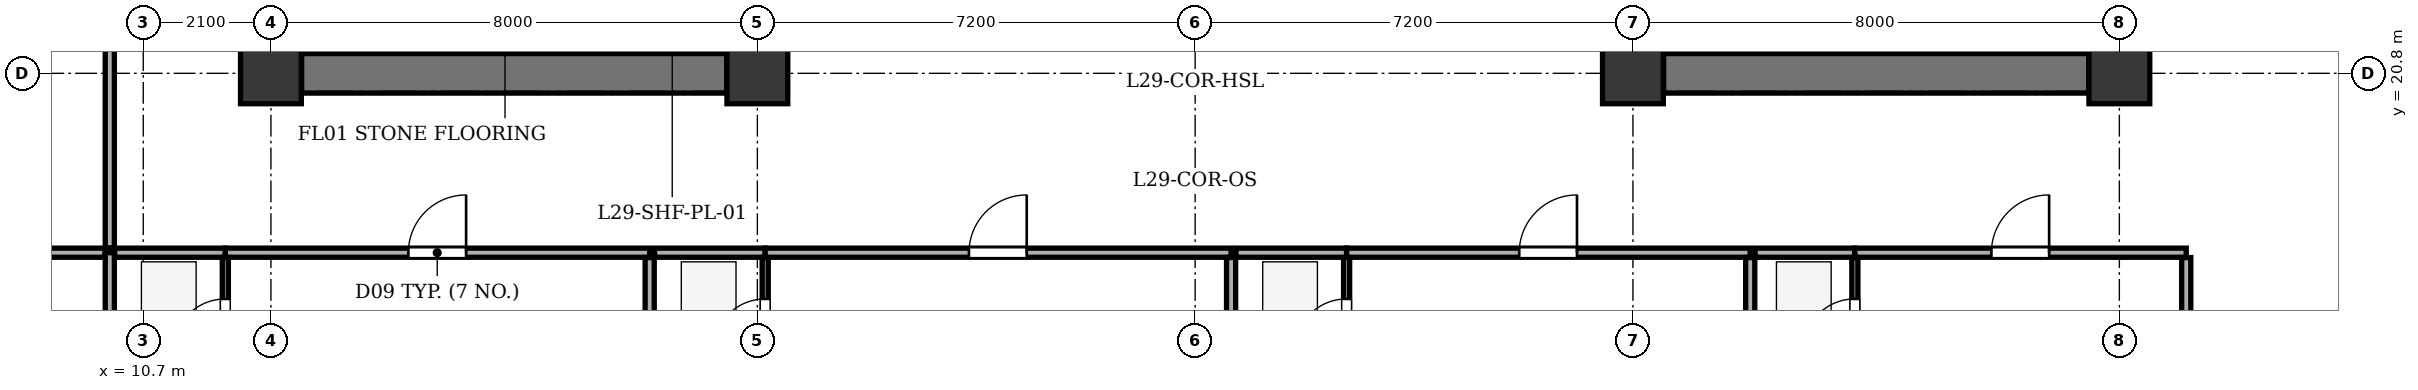
"""IFC4 building model, lengths in metres.
Left out: names, types, materials, properties, quantities, classifications, styles, units other than length and angle.
Written with IfcOpenShell. Run it as: python <this file> out.ifc"""

import sys

from ifc_helpers import new_model, si_unit, direction, frame, frame_2d, origin, origin_2d, place, context, subcontext, project, spatial, rectangle, extrude, element, fill, save


model = new_model("IFC4")
c1 = context("Model", 3, precision=1e-05, world=origin(), true_north=direction((0.0, 1.0)))
c2 = subcontext(c1, "Body", "Model", "MODEL_VIEW")
j1 = project(units=[si_unit("LENGTHUNIT", "METRE"), si_unit("PLANEANGLEUNIT", "RADIAN")], contexts=[c1])
p1 = place(None, origin())
s1 = spatial("IfcSite", under=j1, at=p1, CompositionType="ELEMENT")
p2 = place(p1, origin())
s2 = spatial("IfcBuilding", under=s1, at=p2, CompositionType="ELEMENT")
p3 = place(p2, frame((0.0, 0.0, 120.3)))
s3 = spatial("IfcBuildingStorey", under=s2, at=p3, CompositionType="ELEMENT", Elevation=120.3)
for number, where, z_axis, x_axis in (
    (1, (12.8, 20.8, 0.0), (0.0, 0.0, 1.0), (1.0, 0.0, 0.0)),
    (2, (20.8, 20.8, 0.0), (0.0, 0.0, 1.0), (1.0, 0.0, 0.0)),
    (3, (35.2, 20.8, 0.0), (0.0, 0.0, 1.0), (1.0, 0.0, 0.0)),
    (4, (43.2, 20.8, 0.0), (0.0, 0.0, 1.0), (1.0, 0.0, 0.0)),
):
    element("IfcColumn", number, at=place(p3, frame(where, z_axis=z_axis, x_axis=x_axis)), inside=s3, PredefinedType="COLUMN", context=c2, shape_type="SweptSolid", body=[
        extrude(rectangle(XDim=1.0, YDim=1.0, at=origin_2d()), origin(), (0.0, 0.0, 1.0), 3.5),
    ])
p4 = place(p3, frame((13.305, 20.8, 0.0), z_axis=(0.0, 0.0, 1.0), x_axis=(1.0, 0.0, 0.0)))
e5 = element("IfcWall", 5, at=p4, inside=s3, PredefinedType="SHEAR", context=c2, shape_type="SweptSolid", body=[
    extrude(rectangle(XDim=6.99, YDim=0.65, at=frame_2d((3.495, 0.0))), origin(), (0.0, 0.0, 1.0), 3.2),
])
p5 = place(p3, frame((16.435, 21.135, 0.0), z_axis=(0.0, 0.0, 1.0), x_axis=(0.0, 1.0, 0.0)))
e6 = element("IfcWall", 6, at=p5, inside=s3, PredefinedType="SHEAR", context=c2, shape_type="SweptSolid", body=[
    extrude(rectangle(XDim=12.13, YDim=0.25, at=frame_2d((6.065, 0.0))), origin(), (0.0, 0.0, 1.0), 3.2),
])
p6 = place(p5, frame((0.515, 0.0, 0.0)))
e7 = element("IfcOpeningElement", 7, at=p6, cuts=e6, PredefinedType="OPENING", context=c2, shape_type="SweptSolid", body=[
    extrude(rectangle(XDim=1.2, YDim=2.15, at=frame_2d((0.6, 1.075))), frame((0.0, 0.135, 0.0), z_axis=(0.0, -1.0, 0.0), x_axis=(1.0, 0.0, 0.0)), (0.0, 0.0, 1.0), 0.27),
])
p7 = place(p5, frame((2.665, 0.0, 0.0)))
e8 = element("IfcOpeningElement", 8, at=p7, cuts=e6, PredefinedType="OPENING", context=c2, shape_type="SweptSolid", body=[
    extrude(rectangle(XDim=1.15, YDim=2.15, at=frame_2d((0.575, 1.075))), frame((0.0, 0.135, 0.0), z_axis=(0.0, -1.0, 0.0), x_axis=(1.0, 0.0, 0.0)), (0.0, 0.0, 1.0), 0.27),
])
p8 = place(p3, frame((35.705, 20.8, 0.0), z_axis=(0.0, 0.0, 1.0), x_axis=(1.0, 0.0, 0.0)))
e9 = element("IfcWall", 9, at=p8, inside=s3, PredefinedType="SHEAR", context=c2, shape_type="SweptSolid", body=[
    extrude(rectangle(XDim=6.99, YDim=0.65, at=frame_2d((3.495, 0.0))), origin(), (0.0, 0.0, 1.0), 3.2),
])
p9 = place(p3, frame((39.565, 21.135, 0.0), z_axis=(0.0, 0.0, 1.0), x_axis=(0.0, 1.0, 0.0)))
e10 = element("IfcWall", 10, at=p9, inside=s3, PredefinedType="SHEAR", context=c2, shape_type="SweptSolid", body=[
    extrude(rectangle(XDim=12.13, YDim=0.25, at=frame_2d((6.065, 0.0))), origin(), (0.0, 0.0, 1.0), 3.2),
])
p10 = place(p9, frame((0.515, 0.0, 0.0)))
e11 = element("IfcOpeningElement", 11, at=p10, cuts=e10, PredefinedType="OPENING", context=c2, shape_type="SweptSolid", body=[
    extrude(rectangle(XDim=1.2, YDim=2.15, at=frame_2d((0.6, 1.075))), frame((0.0, 0.135, 0.0), z_axis=(0.0, -1.0, 0.0), x_axis=(1.0, 0.0, 0.0)), (0.0, 0.0, 1.0), 0.27),
])
p11 = place(p9, frame((2.665, 0.0, 0.0)))
e12 = element("IfcOpeningElement", 12, at=p11, cuts=e10, PredefinedType="OPENING", context=c2, shape_type="SweptSolid", body=[
    extrude(rectangle(XDim=1.15, YDim=2.15, at=frame_2d((0.575, 1.075))), frame((0.0, 0.135, 0.0), z_axis=(0.0, -1.0, 0.0), x_axis=(1.0, 0.0, 0.0)), (0.0, 0.0, 1.0), 0.27),
])
p12 = place(p3, frame((10.15, 1.875, 0.0), z_axis=(0.0, 0.0, 1.0), x_axis=(0.0, 1.0, 0.0)))
e13 = element("IfcWall", 13, at=p12, inside=s3, PredefinedType="PARTITIONING", context=c2, shape_type="SweptSolid", body=[
    extrude(rectangle(XDim=15.975, YDim=0.15, at=frame_2d((7.988, 0.0))), origin(), (0.0, 0.0, 1.0), 3.2),
])
p13 = place(p3, frame((10.23, 17.85, 0.0), z_axis=(0.0, 0.0, 1.0), x_axis=(1.0, 0.0, 0.0)))
e14 = element("IfcWall", 14, at=p13, inside=s3, PredefinedType="PARTITIONING", context=c2, shape_type="SweptSolid", body=[
    extrude(rectangle(XDim=1.82, YDim=0.15, at=frame_2d((0.91, 0.0))), origin(), (0.0, 0.0, 1.0), 3.2),
])
p14 = place(p3, frame((12.05, 17.85, 0.0), z_axis=(0.0, 0.0, 1.0), x_axis=(1.0, 0.0, 0.0)))
e15 = element("IfcWall", 15, at=p14, inside=s3, PredefinedType="PARTITIONING", context=c2, shape_type="SweptSolid", body=[
    extrude(rectangle(XDim=6.979, YDim=0.15, at=frame_2d((3.49, 0.0))), origin(), (0.0, 0.0, 1.0), 3.2),
])
p15 = place(p14, frame((3.01, 0.0, 0.0)))
e16 = element("IfcOpeningElement", 16, at=p15, cuts=e15, PredefinedType="OPENING", context=c2, shape_type="SweptSolid", body=[
    extrude(rectangle(XDim=0.95, YDim=2.1, at=frame_2d((0.475, 1.05))), frame((0.0, 0.085, 0.0), z_axis=(0.0, -1.0, 0.0), x_axis=(1.0, 0.0, 0.0)), (0.0, 0.0, 1.0), 0.17),
])
p16 = place(p3, frame((12.05, 15.52, 0.0), z_axis=(0.0, 0.0, 1.0), x_axis=(0.0, 1.0, 0.0)))
e17 = element("IfcWall", 17, at=p16, inside=s3, PredefinedType="PARTITIONING", context=c2, shape_type="SweptSolid", body=[
    extrude(rectangle(XDim=2.25, YDim=0.1, at=frame_2d((1.125, 0.0))), origin(), (0.0, 0.0, 1.0), 3.2),
])
p17 = place(p16, frame((0.72, 0.0, 0.0)))
e18 = element("IfcOpeningElement", 18, at=p17, cuts=e17, PredefinedType="OPENING", context=c2, shape_type="SweptSolid", body=[
    extrude(rectangle(XDim=0.85, YDim=2.05, at=frame_2d((0.425, 1.025))), frame((0.0, 0.06, 0.0), z_axis=(0.0, -1.0, 0.0), x_axis=(1.0, 0.0, 0.0)), (0.0, 0.0, 1.0), 0.12),
])
p18 = place(p3, frame((19.029, 1.875, 0.0), z_axis=(0.0, 0.0, 1.0), x_axis=(0.0, 1.0, 0.0)))
e19 = element("IfcWall", 19, at=p18, inside=s3, PredefinedType="PARTITIONING", context=c2, shape_type="SweptSolid", body=[
    extrude(rectangle(XDim=15.895, YDim=0.15, at=frame_2d((7.948, 0.0))), origin(), (0.0, 0.0, 1.0), 3.2),
])
p19 = place(p3, frame((19.109, 17.85, 0.0), z_axis=(0.0, 0.0, 1.0), x_axis=(1.0, 0.0, 0.0)))
e20 = element("IfcWall", 20, at=p19, inside=s3, PredefinedType="PARTITIONING", context=c2, shape_type="SweptSolid", body=[
    extrude(rectangle(XDim=1.82, YDim=0.15, at=frame_2d((0.91, 0.0))), origin(), (0.0, 0.0, 1.0), 3.2),
])
p20 = place(p3, frame((20.929, 17.85, 0.0), z_axis=(0.0, 0.0, 1.0), x_axis=(1.0, 0.0, 0.0)))
e21 = element("IfcWall", 21, at=p20, inside=s3, PredefinedType="PARTITIONING", context=c2, shape_type="SweptSolid", body=[
    extrude(rectangle(XDim=7.662, YDim=0.15, at=frame_2d((3.831, 0.0))), origin(), (0.0, 0.0, 1.0), 3.2),
])
p21 = place(p20, frame((3.351, 0.0, 0.0)))
e22 = element("IfcOpeningElement", 22, at=p21, cuts=e21, PredefinedType="OPENING", context=c2, shape_type="SweptSolid", body=[
    extrude(rectangle(XDim=0.95, YDim=2.1, at=frame_2d((0.475, 1.05))), frame((0.0, 0.085, 0.0), z_axis=(0.0, -1.0, 0.0), x_axis=(1.0, 0.0, 0.0)), (0.0, 0.0, 1.0), 0.17),
])
p22 = place(p3, frame((20.929, 15.52, 0.0), z_axis=(0.0, 0.0, 1.0), x_axis=(0.0, 1.0, 0.0)))
e23 = element("IfcWall", 23, at=p22, inside=s3, PredefinedType="PARTITIONING", context=c2, shape_type="SweptSolid", body=[
    extrude(rectangle(XDim=2.25, YDim=0.1, at=frame_2d((1.125, 0.0))), origin(), (0.0, 0.0, 1.0), 2.535),
])
p23 = place(p22, frame((0.72, 0.0, 0.0)))
e24 = element("IfcOpeningElement", 24, at=p23, cuts=e23, PredefinedType="OPENING", context=c2, shape_type="SweptSolid", body=[
    extrude(rectangle(XDim=0.85, YDim=2.05, at=frame_2d((0.425, 1.025))), frame((0.0, 0.06, 0.0), z_axis=(0.0, -1.0, 0.0), x_axis=(1.0, 0.0, 0.0)), (0.0, 0.0, 1.0), 0.12),
])
p24 = place(p3, frame((28.591, 1.875, 0.0), z_axis=(0.0, 0.0, 1.0), x_axis=(0.0, 1.0, 0.0)))
e25 = element("IfcWall", 25, at=p24, inside=s3, PredefinedType="PARTITIONING", context=c2, shape_type="SweptSolid", body=[
    extrude(rectangle(XDim=15.895, YDim=0.15, at=frame_2d((7.948, 0.0))), origin(), (0.0, 0.0, 1.0), 3.2),
])
p25 = place(p3, frame((28.671, 17.85, 0.0), z_axis=(0.0, 0.0, 1.0), x_axis=(1.0, 0.0, 0.0)))
e26 = element("IfcWall", 26, at=p25, inside=s3, PredefinedType="PARTITIONING", context=c2, shape_type="SweptSolid", body=[
    extrude(rectangle(XDim=1.82, YDim=0.15, at=frame_2d((0.91, 0.0))), origin(), (0.0, 0.0, 1.0), 3.2),
])
p26 = place(p3, frame((30.491, 17.85, 0.0), z_axis=(0.0, 0.0, 1.0), x_axis=(1.0, 0.0, 0.0)))
e27 = element("IfcWall", 27, at=p26, inside=s3, PredefinedType="PARTITIONING", context=c2, shape_type="SweptSolid", body=[
    extrude(rectangle(XDim=6.638, YDim=0.15, at=frame_2d((3.319, 0.0))), origin(), (0.0, 0.0, 1.0), 3.2),
])
p27 = place(p26, frame((2.839, 0.0, 0.0)))
e28 = element("IfcOpeningElement", 28, at=p27, cuts=e27, PredefinedType="OPENING", context=c2, shape_type="SweptSolid", body=[
    extrude(rectangle(XDim=0.95, YDim=2.1, at=frame_2d((0.475, 1.05))), frame((0.0, 0.085, 0.0), z_axis=(0.0, -1.0, 0.0), x_axis=(1.0, 0.0, 0.0)), (0.0, 0.0, 1.0), 0.17),
])
p28 = place(p3, frame((30.491, 15.52, 0.0), z_axis=(0.0, 0.0, 1.0), x_axis=(0.0, 1.0, 0.0)))
e29 = element("IfcWall", 29, at=p28, inside=s3, PredefinedType="PARTITIONING", context=c2, shape_type="SweptSolid", body=[
    extrude(rectangle(XDim=2.25, YDim=0.1, at=frame_2d((1.125, 0.0))), origin(), (0.0, 0.0, 1.0), 3.2),
])
p29 = place(p28, frame((0.72, 0.0, 0.0)))
e30 = element("IfcOpeningElement", 30, at=p29, cuts=e29, PredefinedType="OPENING", context=c2, shape_type="SweptSolid", body=[
    extrude(rectangle(XDim=0.85, YDim=2.05, at=frame_2d((0.425, 1.025))), frame((0.0, 0.06, 0.0), z_axis=(0.0, -1.0, 0.0), x_axis=(1.0, 0.0, 0.0)), (0.0, 0.0, 1.0), 0.12),
])
p30 = place(p3, frame((37.129, 1.875, 0.0), z_axis=(0.0, 0.0, 1.0), x_axis=(0.0, 1.0, 0.0)))
e31 = element("IfcWall", 31, at=p30, inside=s3, PredefinedType="PARTITIONING", context=c2, shape_type="SweptSolid", body=[
    extrude(rectangle(XDim=15.895, YDim=0.15, at=frame_2d((7.948, 0.0))), origin(), (0.0, 0.0, 1.0), 3.2),
])
p31 = place(p3, frame((37.209, 17.85, 0.0), z_axis=(0.0, 0.0, 1.0), x_axis=(1.0, 0.0, 0.0)))
e32 = element("IfcWall", 32, at=p31, inside=s3, PredefinedType="PARTITIONING", context=c2, shape_type="SweptSolid", body=[
    extrude(rectangle(XDim=1.641, YDim=0.15, at=frame_2d((0.821, 0.0))), origin(), (0.0, 0.0, 1.0), 3.2),
])
p32 = place(p3, frame((38.85, 17.85, 0.0), z_axis=(0.0, 0.0, 1.0), x_axis=(1.0, 0.0, 0.0)))
e33 = element("IfcWall", 33, at=p32, inside=s3, PredefinedType="PARTITIONING", context=c2, shape_type="SweptSolid", body=[
    extrude(rectangle(XDim=5.45, YDim=0.15, at=frame_2d((2.725, 0.0))), origin(), (0.0, 0.0, 1.0), 3.2),
])
p33 = place(p32, frame((2.245, 0.0, 0.0)))
e34 = element("IfcOpeningElement", 34, at=p33, cuts=e33, PredefinedType="OPENING", context=c2, shape_type="SweptSolid", body=[
    extrude(rectangle(XDim=0.95, YDim=2.1, at=frame_2d((0.475, 1.05))), frame((0.0, 0.085, 0.0), z_axis=(0.0, -1.0, 0.0), x_axis=(1.0, 0.0, 0.0)), (0.0, 0.0, 1.0), 0.17),
])
p34 = place(p3, frame((38.85, 15.52, 0.0), z_axis=(0.0, 0.0, 1.0), x_axis=(0.0, 1.0, 0.0)))
e35 = element("IfcWall", 35, at=p34, inside=s3, PredefinedType="PARTITIONING", context=c2, shape_type="SweptSolid", body=[
    extrude(rectangle(XDim=2.25, YDim=0.1, at=frame_2d((1.125, 0.0))), origin(), (0.0, 0.0, 1.0), 3.2),
])
p35 = place(p34, frame((0.72, 0.0, 0.0)))
e36 = element("IfcOpeningElement", 36, at=p35, cuts=e35, PredefinedType="OPENING", context=c2, shape_type="SweptSolid", body=[
    extrude(rectangle(XDim=0.85, YDim=2.05, at=frame_2d((0.425, 1.025))), frame((0.0, 0.06, 0.0), z_axis=(0.0, -1.0, 0.0), x_axis=(1.0, 0.0, 0.0)), (0.0, 0.0, 1.0), 0.12),
])
p36 = place(p3, frame((44.3, 1.875, 0.0), z_axis=(0.0, 0.0, 1.0), x_axis=(0.0, 1.0, 0.0)))
e37 = element("IfcWall", 37, at=p36, inside=s3, PredefinedType="PARTITIONING", context=c2, shape_type="SweptSolid", body=[
    extrude(rectangle(XDim=15.895, YDim=0.15, at=frame_2d((7.948, 0.0))), origin(), (0.0, 0.0, 1.0), 3.2),
])
p37 = place(p3, frame((4.675, 17.85, 0.0), z_axis=(0.0, 0.0, 1.0), x_axis=(1.0, 0.0, 0.0)))
e38 = element("IfcWall", 38, at=p37, inside=s3, PredefinedType="PARTITIONING", context=c2, shape_type="SweptSolid", body=[
    extrude(rectangle(XDim=5.395, YDim=0.15, at=frame_2d((2.698, 0.0))), origin(), (0.0, 0.0, 1.0), 3.2),
])
p38 = place(p3, frame((10.15, 17.93, 0.0), z_axis=(0.0, 0.0, 1.0), x_axis=(0.0, 1.0, 0.0)))
e39 = element("IfcWall", 39, at=p38, inside=s3, PredefinedType="PARTITIONING", context=c2, shape_type="SweptSolid", body=[
    extrude(rectangle(XDim=18.54, YDim=0.15, at=frame_2d((9.27, 0.0))), origin(), (0.0, 0.0, 1.0), 3.2),
])
p39 = place(p38, frame((8.79, 0.0, 0.0)))
e40 = element("IfcOpeningElement", 40, at=p39, cuts=e39, PredefinedType="OPENING", context=c2, shape_type="SweptSolid", body=[
    extrude(rectangle(XDim=0.95, YDim=2.1, at=frame_2d((0.475, 1.05))), frame((0.0, 0.085, 0.0), z_axis=(0.0, -1.0, 0.0), x_axis=(1.0, 0.0, 0.0)), (0.0, 0.0, 1.0), 0.17),
])
p40 = place(p17, origin())
e41 = element("IfcDoor", 41, at=p40, inside=s3, OperationType="SINGLE_SWING_LEFT", PredefinedType="DOOR", context=c2, shape_type="SweptSolid", body=[
    extrude(rectangle(XDim=0.85, YDim=2.05, at=frame_2d((0.425, 1.025))), frame((0.0, 0.025, 0.0), z_axis=(0.0, -1.0, 0.0), x_axis=(1.0, 0.0, 0.0)), (0.0, 0.0, 1.0), 0.05),
])
fill(e18, e41)
p41 = place(p15, origin())
e42 = element("IfcDoor", 42, at=p41, inside=s3, OperationType="SINGLE_SWING_RIGHT", PredefinedType="DOOR", context=c2, shape_type="SweptSolid", body=[
    extrude(rectangle(XDim=0.95, YDim=2.1, at=frame_2d((0.475, 1.05))), frame((0.0, 0.025, 0.0), z_axis=(0.0, -1.0, 0.0), x_axis=(1.0, 0.0, 0.0)), (0.0, 0.0, 1.0), 0.05),
])
fill(e16, e42)
p42 = place(p23, origin())
e43 = element("IfcDoor", 43, at=p42, inside=s3, OperationType="SINGLE_SWING_LEFT", PredefinedType="DOOR", context=c2, shape_type="SweptSolid", body=[
    extrude(rectangle(XDim=0.85, YDim=2.05, at=frame_2d((0.425, 1.025))), frame((0.0, 0.025, 0.0), z_axis=(0.0, -1.0, 0.0), x_axis=(1.0, 0.0, 0.0)), (0.0, 0.0, 1.0), 0.05),
])
fill(e24, e43)
p43 = place(p21, origin())
e44 = element("IfcDoor", 44, at=p43, inside=s3, OperationType="SINGLE_SWING_RIGHT", PredefinedType="DOOR", context=c2, shape_type="SweptSolid", body=[
    extrude(rectangle(XDim=0.95, YDim=2.1, at=frame_2d((0.475, 1.05))), frame((0.0, 0.025, 0.0), z_axis=(0.0, -1.0, 0.0), x_axis=(1.0, 0.0, 0.0)), (0.0, 0.0, 1.0), 0.05),
])
fill(e22, e44)
p44 = place(p29, origin())
e45 = element("IfcDoor", 45, at=p44, inside=s3, OperationType="SINGLE_SWING_LEFT", PredefinedType="DOOR", context=c2, shape_type="SweptSolid", body=[
    extrude(rectangle(XDim=0.85, YDim=2.05, at=frame_2d((0.425, 1.025))), frame((0.0, 0.025, 0.0), z_axis=(0.0, -1.0, 0.0), x_axis=(1.0, 0.0, 0.0)), (0.0, 0.0, 1.0), 0.05),
])
fill(e30, e45)
p45 = place(p27, origin())
e46 = element("IfcDoor", 46, at=p45, inside=s3, OperationType="SINGLE_SWING_RIGHT", PredefinedType="DOOR", context=c2, shape_type="SweptSolid", body=[
    extrude(rectangle(XDim=0.95, YDim=2.1, at=frame_2d((0.475, 1.05))), frame((0.0, 0.025, 0.0), z_axis=(0.0, -1.0, 0.0), x_axis=(1.0, 0.0, 0.0)), (0.0, 0.0, 1.0), 0.05),
])
fill(e28, e46)
p46 = place(p35, origin())
e47 = element("IfcDoor", 47, at=p46, inside=s3, OperationType="SINGLE_SWING_LEFT", PredefinedType="DOOR", context=c2, shape_type="SweptSolid", body=[
    extrude(rectangle(XDim=0.85, YDim=2.05, at=frame_2d((0.425, 1.025))), frame((0.0, 0.025, 0.0), z_axis=(0.0, -1.0, 0.0), x_axis=(1.0, 0.0, 0.0)), (0.0, 0.0, 1.0), 0.05),
])
fill(e36, e47)
p47 = place(p33, origin())
e48 = element("IfcDoor", 48, at=p47, inside=s3, OperationType="SINGLE_SWING_RIGHT", PredefinedType="DOOR", context=c2, shape_type="SweptSolid", body=[
    extrude(rectangle(XDim=0.95, YDim=2.1, at=frame_2d((0.475, 1.05))), frame((0.0, 0.025, 0.0), z_axis=(0.0, -1.0, 0.0), x_axis=(1.0, 0.0, 0.0)), (0.0, 0.0, 1.0), 0.05),
])
fill(e34, e48)
save(model, sys.argv[1])
